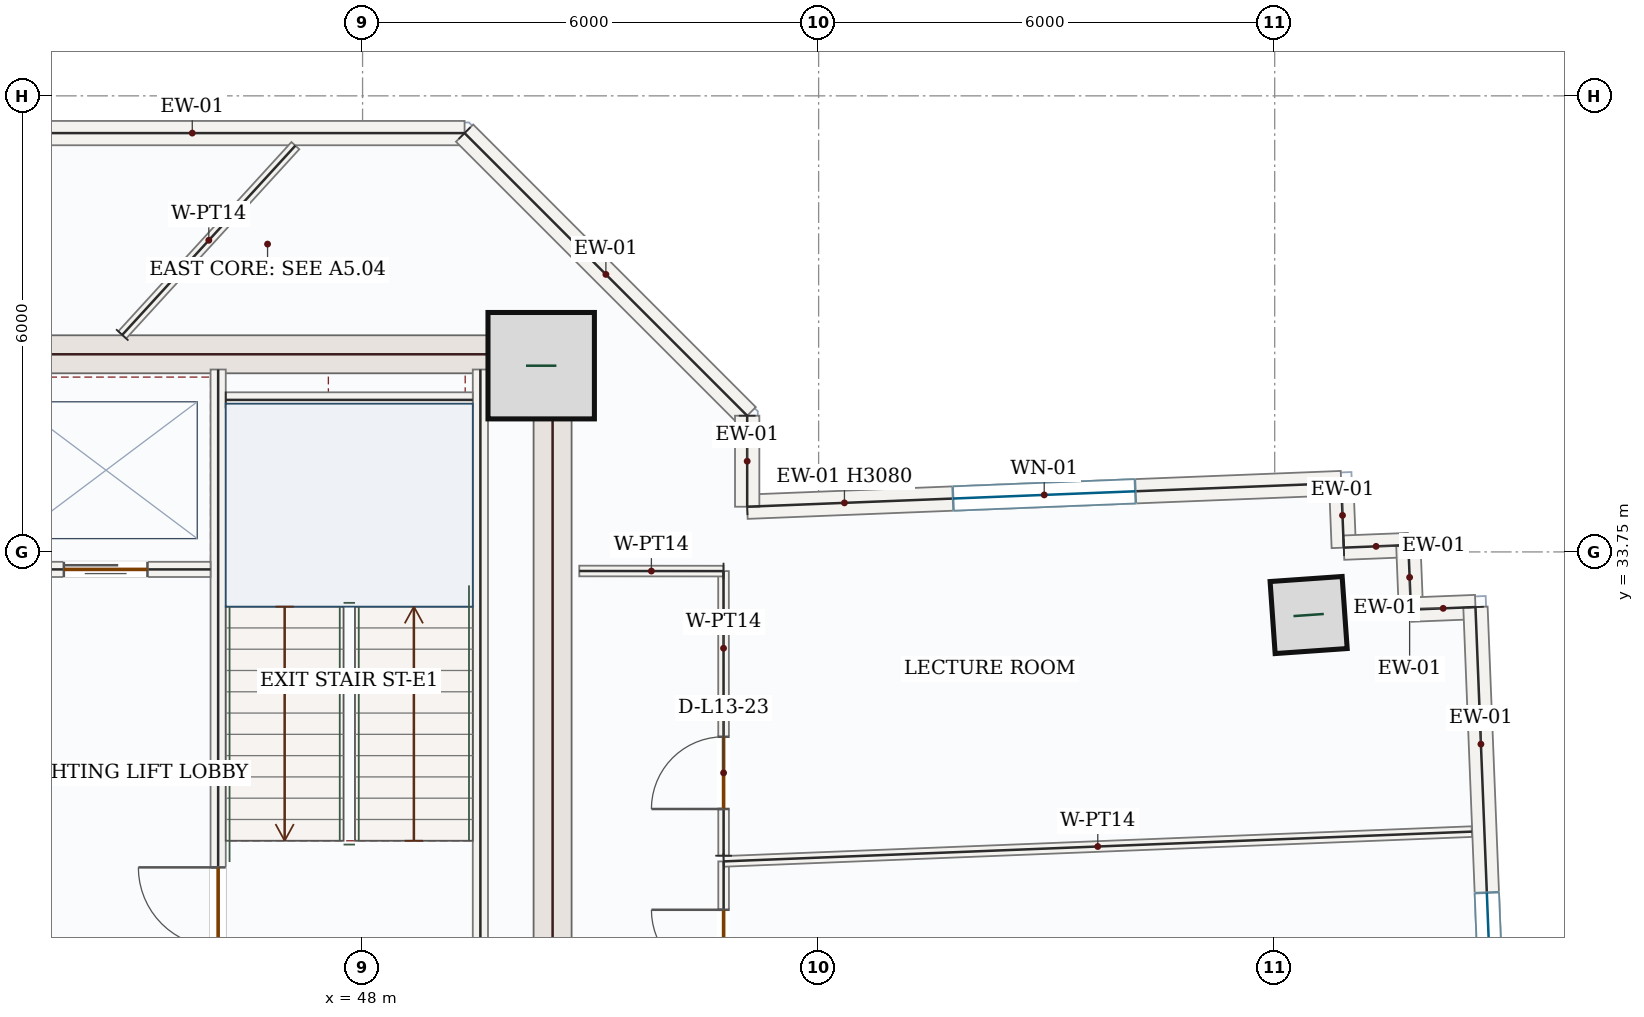
"""IFC4 building model, lengths in metres.
Left out: names, types, materials, properties, quantities, classifications, styles, units other than length and angle.
Written with IfcOpenShell. Run it as: python <this file> out.ifc"""

import sys

from ifc_helpers import new_model, si_unit, direction, frame, frame_2d, origin, origin_2d, place, context, subcontext, project, spatial, rectangle, hollow_rectangle, extrude, source, transform, mapped, element, fill, save


model = new_model("IFC4")
c1 = context("Model", 3, precision=1e-05, world=origin(), true_north=direction((0.0, 1.0)))
c2 = subcontext(c1, "Body", "Model", "MODEL_VIEW")
j1 = project(units=[si_unit("LENGTHUNIT", "METRE"), si_unit("PLANEANGLEUNIT", "RADIAN")], contexts=[c1])
p1 = place(None, origin())
s1 = spatial("IfcSite", under=j1, at=p1, CompositionType="ELEMENT")
p2 = place(p1, origin())
s2 = spatial("IfcBuilding", under=s1, at=p2, CompositionType="ELEMENT")
p3 = place(p2, frame((0.0, 0.0, 62.7)))
s3 = spatial("IfcBuildingStorey", under=s2, at=p3, CompositionType="ELEMENT", Elevation=62.7)
m1 = source(origin(), c2, "Body", "SweptSolid", [
    extrude(rectangle(XDim=8.55, YDim=0.5, at=frame_2d((4.275, 0.0))), origin(), (0.0, 0.0, 1.0), 3.95),
])
p4 = place(p3, frame((50.5, 28.05, 0.0), z_axis=(0.0, 0.0, 1.0), x_axis=(0.0, 1.0, 0.0)))
e1 = element("IfcWall", 1, at=p4, inside=s3, PredefinedType="SHEAR", context=c2, shape_type="MappedRepresentation", body=[
    mapped(m1, transform((0.0, 0.0, 0.0), x_axis=(1.0, 0.0, 0.0), y_axis=(0.0, 1.0, 0.0), z_axis=(0.0, 0.0, 1.0), scale=1.0)),
])
m2 = source(origin(), c2, "Body", "SweptSolid", [
    extrude(rectangle(XDim=7.0, YDim=0.5, at=frame_2d((3.5, 0.0))), origin(), (0.0, 0.0, 1.0), 3.95),
])
p5 = place(p3, frame((43.25, 36.35, 0.0), z_axis=(0.0, 0.0, 1.0), x_axis=(1.0, 0.0, 0.0)))
e2 = element("IfcWall", 2, at=p5, inside=s3, PredefinedType="SHEAR", context=c2, shape_type="MappedRepresentation", body=[
    mapped(m2, transform((0.0, 0.0, 0.0), x_axis=(1.0, 0.0, 0.0), y_axis=(0.0, 1.0, 0.0), z_axis=(0.0, 0.0, 1.0), scale=1.0)),
])
m3 = source(origin(), c2, "Body", "SweptSolid", [
    extrude(rectangle(XDim=1.4, YDim=1.4, at=origin_2d()), origin(), (0.0, 0.0, 1.0), 4.2),
])
p6 = place(p3, frame((50.35, 36.2, 0.0), z_axis=(0.0, 0.0, 1.0), x_axis=(1.0, 0.0, 0.0)))
e3 = element("IfcColumn", 3, at=p6, inside=s3, PredefinedType="COLUMN", context=c2, shape_type="MappedRepresentation", body=[
    mapped(m3, transform((0.0, 0.0, 0.0), x_axis=(1.0, 0.0, 0.0), y_axis=(0.0, 1.0, 0.0), z_axis=(0.0, 0.0, 1.0), scale=1.0)),
])
m4 = source(origin(), c2, "Body", "SweptSolid", [
    extrude(hollow_rectangle(XDim=0.95, YDim=0.95, WallThickness=0.05, at=origin_2d()), origin(), (0.0, 0.0, 1.0), 4.2),
])
p7 = place(p3, frame((60.447, 32.92, 0.0), z_axis=(0.0, 0.0, 1.0), x_axis=(0.99756405026, 0.069756473744, 0.0)))
e4 = element("IfcColumn", 4, at=p7, inside=s3, PredefinedType="COLUMN", context=c2, shape_type="MappedRepresentation", body=[
    mapped(m4, transform((0.0, 0.0, 0.0), x_axis=(1.0, 0.0, 0.0), y_axis=(0.0, 1.0, 0.0), z_axis=(0.0, 0.0, 1.0), scale=1.0)),
])
p8 = place(p3, frame((53.06, 34.344, 0.0), z_axis=(0.0, 0.0, 1.0), x_axis=(0.999208917222, 0.039768577336, 0.0)))
e5 = element("IfcWall", 5, at=p8, inside=s3, PredefinedType="SOLIDWALL", context=c2, shape_type="SweptSolid", body=[
    extrude(rectangle(XDim=7.821, YDim=0.32, at=frame_2d((3.911, 0.0))), origin(), (0.0, 0.0, 1.0), 3.08),
])
p9 = place(p8, frame((2.711, 0.0, 0.85)))
e6 = element("IfcOpeningElement", 6, at=p9, cuts=e5, PredefinedType="OPENING", context=c2, shape_type="SweptSolid", body=[
    extrude(rectangle(XDim=2.4, YDim=1.8, at=frame_2d((1.2, 0.9))), frame((0.0, 0.17, 0.0), z_axis=(0.0, -1.0, 0.0), x_axis=(1.0, 0.0, 0.0)), (0.0, 0.0, 1.0), 0.34),
])
m5 = source(origin(), c2, "Body", "SweptSolid", [
    extrude(rectangle(XDim=0.85, YDim=0.32, at=frame_2d((0.425, 0.0))), origin(), (0.0, 0.0, 1.0), 3.95),
])
p10 = place(p3, frame((60.875, 34.656, 0.0), z_axis=(0.0, 0.0, 1.0), x_axis=(0.039933618331, -0.999202334929, 0.0)))
e7 = element("IfcWall", 7, at=p10, inside=s3, PredefinedType="SOLIDWALL", context=c2, shape_type="MappedRepresentation", body=[
    mapped(m5, transform((0.0, 0.0, 0.0), x_axis=(1.0, 0.0, 0.0), y_axis=(0.0, 1.0, 0.0), z_axis=(0.0, 0.0, 1.0), scale=1.0)),
])
m6 = source(origin(), c2, "Body", "SweptSolid", [
    extrude(rectangle(XDim=0.85, YDim=0.32, at=frame_2d((0.425, 0.0))), origin(), (0.0, 0.0, 1.0), 3.95),
])
for number, where, z_axis, x_axis in (
    (8, (60.909, 33.806, 0.0), (0.0, 0.0, 1.0), (0.999, 0.04, 0.0)),
    (9, (61.758, 33.84, 0.0), (0.0, 0.0, 1.0), (0.04, -0.999, 0.0)),
    (10, (61.792, 32.991, 0.0), (0.0, 0.0, 1.0), (0.999, 0.04, 0.0)),
):
    element("IfcWall", number, at=place(p3, frame(where, z_axis=z_axis, x_axis=x_axis)), inside=s3, PredefinedType="SOLIDWALL", context=c2, shape_type="MappedRepresentation", body=[
        mapped(m6, transform((0.0, 0.0, 0.0), x_axis=(1.0, 0.0, 0.0), y_axis=(0.0, 1.0, 0.0), z_axis=(0.0, 0.0, 1.0), scale=1.0)),
    ])
p11 = place(p3, frame((62.641, 33.025, 0.0), z_axis=(0.0, 0.0, 1.0), x_axis=(0.03977146366, -0.999208802342, 0.0)))
e11 = element("IfcWall", 11, at=p11, inside=s3, PredefinedType="SOLIDWALL", context=c2, shape_type="SweptSolid", body=[
    extrude(rectangle(XDim=9.92, YDim=0.32, at=frame_2d((4.96, 0.0))), origin(), (0.0, 0.0, 1.0), 3.95),
])
p12 = place(p11, frame((3.76, 0.0, 0.85)))
e12 = element("IfcOpeningElement", 12, at=p12, cuts=e11, PredefinedType="OPENING", context=c2, shape_type="SweptSolid", body=[
    extrude(rectangle(XDim=2.4, YDim=1.8, at=frame_2d((1.2, 0.9))), frame((0.0, 0.17, 0.0), z_axis=(0.0, -1.0, 0.0), x_axis=(1.0, 0.0, 0.0)), (0.0, 0.0, 1.0), 0.34),
])
m7 = source(origin(), c2, "Body", "SweptSolid", [
    extrude(rectangle(XDim=7.165, YDim=0.32, at=frame_2d((3.583, 0.0))), origin(), (0.0, 0.0, 1.0), 3.95),
])
p13 = place(p3, frame((42.177, 39.26, 0.0), z_axis=(0.0, 0.0, 1.0), x_axis=(1.0, 0.0, 0.0)))
e13 = element("IfcWall", 13, at=p13, inside=s3, PredefinedType="SOLIDWALL", context=c2, shape_type="MappedRepresentation", body=[
    mapped(m7, transform((0.0, 0.0, 0.0), x_axis=(1.0, 0.0, 0.0), y_axis=(0.0, 1.0, 0.0), z_axis=(0.0, 0.0, 1.0), scale=1.0)),
])
m8 = source(origin(), c2, "Body", "SweptSolid", [
    extrude(rectangle(XDim=5.258, YDim=0.32, at=frame_2d((2.629, 0.0))), origin(), (0.0, 0.0, 1.0), 3.95),
])
p14 = place(p3, frame((49.342, 39.26, 0.0), z_axis=(0.0, 0.0, 1.0), x_axis=(0.707106781187, -0.707106781187, 0.0)))
e14 = element("IfcWall", 14, at=p14, inside=s3, PredefinedType="SOLIDWALL", context=c2, shape_type="MappedRepresentation", body=[
    mapped(m8, transform((0.0, 0.0, 0.0), x_axis=(1.0, 0.0, 0.0), y_axis=(0.0, 1.0, 0.0), z_axis=(0.0, 0.0, 1.0), scale=1.0)),
])
m9 = source(origin(), c2, "Body", "SweptSolid", [
    extrude(rectangle(XDim=1.198, YDim=0.32, at=frame_2d((0.599, 0.0))), origin(), (0.0, 0.0, 1.0), 3.95),
])
p15 = place(p3, frame((53.06, 35.542, 0.0), z_axis=(0.0, 0.0, 1.0), x_axis=(0.0, -1.0, 0.0)))
e15 = element("IfcWall", 15, at=p15, inside=s3, PredefinedType="SOLIDWALL", context=c2, shape_type="MappedRepresentation", body=[
    mapped(m9, transform((0.0, 0.0, 0.0), x_axis=(1.0, 0.0, 0.0), y_axis=(0.0, 1.0, 0.0), z_axis=(0.0, 0.0, 1.0), scale=1.0)),
])
m10 = source(origin(), c2, "Body", "SweptSolid", [
    extrude(rectangle(XDim=7.87, YDim=0.2, at=frame_2d((3.935, 0.0))), origin(), (0.0, 0.0, 1.0), 3.95),
])
p16 = place(p3, frame((49.55, 28.28, 0.0), z_axis=(0.0, 0.0, 1.0), x_axis=(0.0, 1.0, 0.0)))
e16 = element("IfcWall", 16, at=p16, inside=s3, PredefinedType="SOLIDWALL", context=c2, shape_type="MappedRepresentation", body=[
    mapped(m10, transform((0.0, 0.0, 0.0), x_axis=(1.0, 0.0, 0.0), y_axis=(0.0, 1.0, 0.0), z_axis=(0.0, 0.0, 1.0), scale=1.0)),
])
p17 = place(p3, frame((46.1, 28.15, 0.0), z_axis=(0.0, 0.0, 1.0), x_axis=(0.0, 1.0, 0.0)))
e17 = element("IfcWall", 17, at=p17, inside=s3, PredefinedType="SOLIDWALL", context=c2, shape_type="SweptSolid", body=[
    extrude(rectangle(XDim=8.0, YDim=0.2, at=frame_2d((4.0, 0.0))), origin(), (0.0, 0.0, 1.0), 3.95),
])
p18 = place(p17, frame((0.4, 0.0, 0.0)))
e18 = element("IfcOpeningElement", 18, at=p18, cuts=e17, PredefinedType="OPENING", context=c2, shape_type="SweptSolid", body=[
    extrude(rectangle(XDim=1.05, YDim=2.15, at=frame_2d((0.525, 1.075))), frame((0.0, 0.11, 0.0), z_axis=(0.0, -1.0, 0.0), x_axis=(1.0, 0.0, 0.0)), (0.0, 0.0, 1.0), 0.22),
])
m11 = source(origin(), c2, "Body", "SweptSolid", [
    extrude(rectangle(XDim=3.25, YDim=0.2, at=frame_2d((1.625, 0.0))), origin(), (0.0, 0.0, 1.0), 3.95),
])
p19 = place(p3, frame((46.2, 35.75, 0.0), z_axis=(0.0, 0.0, 1.0), x_axis=(1.0, 0.0, 0.0)))
e19 = element("IfcWall", 19, at=p19, inside=s3, PredefinedType="SOLIDWALL", context=c2, shape_type="MappedRepresentation", body=[
    mapped(m11, transform((0.0, 0.0, 0.0), x_axis=(1.0, 0.0, 0.0), y_axis=(0.0, 1.0, 0.0), z_axis=(0.0, 0.0, 1.0), scale=1.0)),
])
p20 = place(p3, frame((43.25, 33.52, 0.0), z_axis=(0.0, 0.0, 1.0), x_axis=(1.0, 0.0, 0.0)))
e20 = element("IfcWall", 20, at=p20, inside=s3, PredefinedType="SOLIDWALL", context=c2, shape_type="SweptSolid", body=[
    extrude(rectangle(XDim=2.75, YDim=0.2, at=frame_2d((1.375, 0.0))), origin(), (0.0, 0.0, 1.0), 3.95),
])
p21 = place(p20, frame((0.82, 0.0, 0.0)))
e21 = element("IfcOpeningElement", 21, at=p21, cuts=e20, PredefinedType="OPENING", context=c2, shape_type="SweptSolid", body=[
    extrude(rectangle(XDim=1.1, YDim=2.15, at=frame_2d((0.55, 1.075))), frame((0.0, 0.11, 0.0), z_axis=(0.0, -1.0, 0.0), x_axis=(1.0, 0.0, 0.0)), (0.0, 0.0, 1.0), 0.22),
])
p22 = place(p3, frame((52.75, 25.835, 0.0), z_axis=(0.0, 0.0, 1.0), x_axis=(0.0, 1.0, 0.0)))
e22 = element("IfcWall", 22, at=p22, inside=s3, PredefinedType="PARTITIONING", context=c2, shape_type="SweptSolid", body=[
    extrude(rectangle(XDim=3.843, YDim=0.14, at=frame_2d((1.921, 0.0))), origin(), (0.0, 0.0, 1.0), 3.95),
])
p23 = place(p22, frame((2.257, 0.0, 0.0)))
e23 = element("IfcOpeningElement", 23, at=p23, cuts=e22, PredefinedType="OPENING", context=c2, shape_type="SweptSolid", body=[
    extrude(rectangle(XDim=0.95, YDim=2.15, at=frame_2d((0.475, 1.075))), frame((0.0, 0.08, 0.0), z_axis=(0.0, -1.0, 0.0), x_axis=(1.0, 0.0, 0.0)), (0.0, 0.0, 1.0), 0.16),
])
m12 = source(origin(), c2, "Body", "SweptSolid", [
    extrude(rectangle(XDim=9.851, YDim=0.14, at=frame_2d((4.925, 0.0))), origin(), (0.0, 0.0, 1.0), 3.95),
])
p24 = place(p3, frame((52.751, 29.678, 0.0), z_axis=(0.0, 0.0, 1.0), x_axis=(0.999208542072, 0.039778002084, 0.0)))
e24 = element("IfcWall", 24, at=p24, inside=s3, PredefinedType="PARTITIONING", context=c2, shape_type="MappedRepresentation", body=[
    mapped(m12, transform((0.0, 0.0, 0.0), x_axis=(1.0, 0.0, 0.0), y_axis=(0.0, 1.0, 0.0), z_axis=(0.0, 0.0, 1.0), scale=1.0)),
])
m13 = source(origin(), c2, "Body", "SweptSolid", [
    extrude(rectangle(XDim=3.375, YDim=0.14, at=frame_2d((1.688, 0.0))), origin(), (0.0, 0.0, 1.0), 3.95),
])
p25 = place(p3, frame((44.838, 36.605, 0.0), z_axis=(0.0, 0.0, 1.0), x_axis=(0.674974079893, 0.737841440604, 0.0)))
e25 = element("IfcWall", 25, at=p25, inside=s3, PredefinedType="PARTITIONING", context=c2, shape_type="MappedRepresentation", body=[
    mapped(m13, transform((0.0, 0.0, 0.0), x_axis=(1.0, 0.0, 0.0), y_axis=(0.0, 1.0, 0.0), z_axis=(0.0, 0.0, 1.0), scale=1.0)),
])
p26 = place(p3, frame((52.75, 29.753, 0.0), z_axis=(0.0, 0.0, 1.0), x_axis=(-0.000326030238, 0.999999946852, 0.0)))
e26 = element("IfcWall", 26, at=p26, inside=s3, PredefinedType="PARTITIONING", context=c2, shape_type="SweptSolid", body=[
    extrude(rectangle(XDim=3.744, YDim=0.14, at=frame_2d((1.872, 0.0))), origin(), (0.0, 0.0, 1.0), 3.95),
])
p27 = place(p26, frame((0.615, 0.0, 0.0)))
e27 = element("IfcOpeningElement", 27, at=p27, cuts=e26, PredefinedType="OPENING", context=c2, shape_type="SweptSolid", body=[
    extrude(rectangle(XDim=0.95, YDim=2.15, at=frame_2d((0.475, 1.075))), frame((0.0, 0.08, 0.0), z_axis=(0.0, -1.0, 0.0), x_axis=(1.0, 0.0, 0.0)), (0.0, 0.0, 1.0), 0.16),
])
m14 = source(origin(), c2, "Body", "SweptSolid", [
    extrude(rectangle(XDim=1.898, YDim=0.14, at=frame_2d((0.949, 0.0))), origin(), (0.0, 0.0, 1.0), 3.95),
])
p28 = place(p3, frame((52.749, 33.498, 0.0), z_axis=(0.0, 0.0, 1.0), x_axis=(-0.999999702083, 0.00077190251, 0.0)))
e28 = element("IfcWall", 28, at=p28, inside=s3, PredefinedType="PARTITIONING", context=c2, shape_type="MappedRepresentation", body=[
    mapped(m14, transform((0.0, 0.0, 0.0), x_axis=(1.0, 0.0, 0.0), y_axis=(0.0, 1.0, 0.0), z_axis=(0.0, 0.0, 1.0), scale=1.0)),
])
m15 = source(origin(), c2, "Body", "SweptSolid", [
    extrude(rectangle(XDim=2.4, YDim=1.8, at=frame_2d((1.2, 0.9))), frame((0.0, 0.03, 0.0), z_axis=(0.0, -1.0, 0.0), x_axis=(1.0, 0.0, 0.0)), (0.0, 0.0, 1.0), 0.06),
])
p29 = place(p9, origin())
e29 = element("IfcWindow", 29, at=p29, inside=s3, PartitioningType="DOUBLE_PANEL_VERTICAL", PredefinedType="WINDOW", context=c2, shape_type="MappedRepresentation", body=[
    mapped(m15, transform((0.0, 0.0, 0.0), x_axis=(1.0, 0.0, 0.0), y_axis=(0.0, 1.0, 0.0), z_axis=(0.0, 0.0, 1.0), scale=1.0)),
])
fill(e6, e29)
p30 = place(p12, origin())
e30 = element("IfcWindow", 30, at=p30, inside=s3, PartitioningType="DOUBLE_PANEL_VERTICAL", PredefinedType="WINDOW", context=c2, shape_type="MappedRepresentation", body=[
    mapped(m15, transform((0.0, 0.0, 0.0), x_axis=(1.0, 0.0, 0.0), y_axis=(0.0, 1.0, 0.0), z_axis=(0.0, 0.0, 1.0), scale=1.0)),
])
fill(e12, e30)
m16 = source(origin(), c2, "Body", "SweptSolid", [
    extrude(rectangle(XDim=1.05, YDim=2.15, at=frame_2d((0.525, 1.075))), frame((0.0, 0.025, 0.0), z_axis=(0.0, -1.0, 0.0), x_axis=(1.0, 0.0, 0.0)), (0.0, 0.0, 1.0), 0.05),
])
p31 = place(p18, origin())
e31 = element("IfcDoor", 31, at=p31, inside=s3, OperationType="SINGLE_SWING_RIGHT", PredefinedType="DOOR", context=c2, shape_type="MappedRepresentation", body=[
    mapped(m16, transform((0.0, 0.0, 0.0), x_axis=(1.0, 0.0, 0.0), y_axis=(0.0, 1.0, 0.0), z_axis=(0.0, 0.0, 1.0), scale=1.0)),
])
fill(e18, e31)
m17 = source(origin(), c2, "Body", "SweptSolid", [
    extrude(rectangle(XDim=1.1, YDim=2.15, at=frame_2d((0.55, 1.075))), frame((0.0, 0.025, 0.0), z_axis=(0.0, -1.0, 0.0), x_axis=(1.0, 0.0, 0.0)), (0.0, 0.0, 1.0), 0.05),
])
p32 = place(p21, origin())
e32 = element("IfcDoor", 32, at=p32, inside=s3, OperationType="DOUBLE_DOOR_SLIDING", PredefinedType="DOOR", context=c2, shape_type="MappedRepresentation", body=[
    mapped(m17, transform((0.0, 0.0, 0.0), x_axis=(1.0, 0.0, 0.0), y_axis=(0.0, 1.0, 0.0), z_axis=(0.0, 0.0, 1.0), scale=1.0)),
])
fill(e21, e32)
m18 = source(origin(), c2, "Body", "SweptSolid", [
    extrude(rectangle(XDim=0.95, YDim=2.15, at=frame_2d((0.475, 1.075))), frame((0.0, 0.025, 0.0), z_axis=(0.0, -1.0, 0.0), x_axis=(1.0, 0.0, 0.0)), (0.0, 0.0, 1.0), 0.05),
])
p33 = place(p23, origin())
e33 = element("IfcDoor", 33, at=p33, inside=s3, OperationType="SINGLE_SWING_RIGHT", PredefinedType="DOOR", context=c2, shape_type="MappedRepresentation", body=[
    mapped(m18, transform((0.0, 0.0, 0.0), x_axis=(1.0, 0.0, 0.0), y_axis=(0.0, 1.0, 0.0), z_axis=(0.0, 0.0, 1.0), scale=1.0)),
])
fill(e23, e33)
p34 = place(p27, origin())
e34 = element("IfcDoor", 34, at=p34, inside=s3, OperationType="SINGLE_SWING_LEFT", PredefinedType="DOOR", context=c2, shape_type="MappedRepresentation", body=[
    mapped(m18, transform((0.0, 0.0, 0.0), x_axis=(1.0, 0.0, 0.0), y_axis=(0.0, 1.0, 0.0), z_axis=(0.0, 0.0, 1.0), scale=1.0)),
])
fill(e27, e34)
save(model, sys.argv[1])
